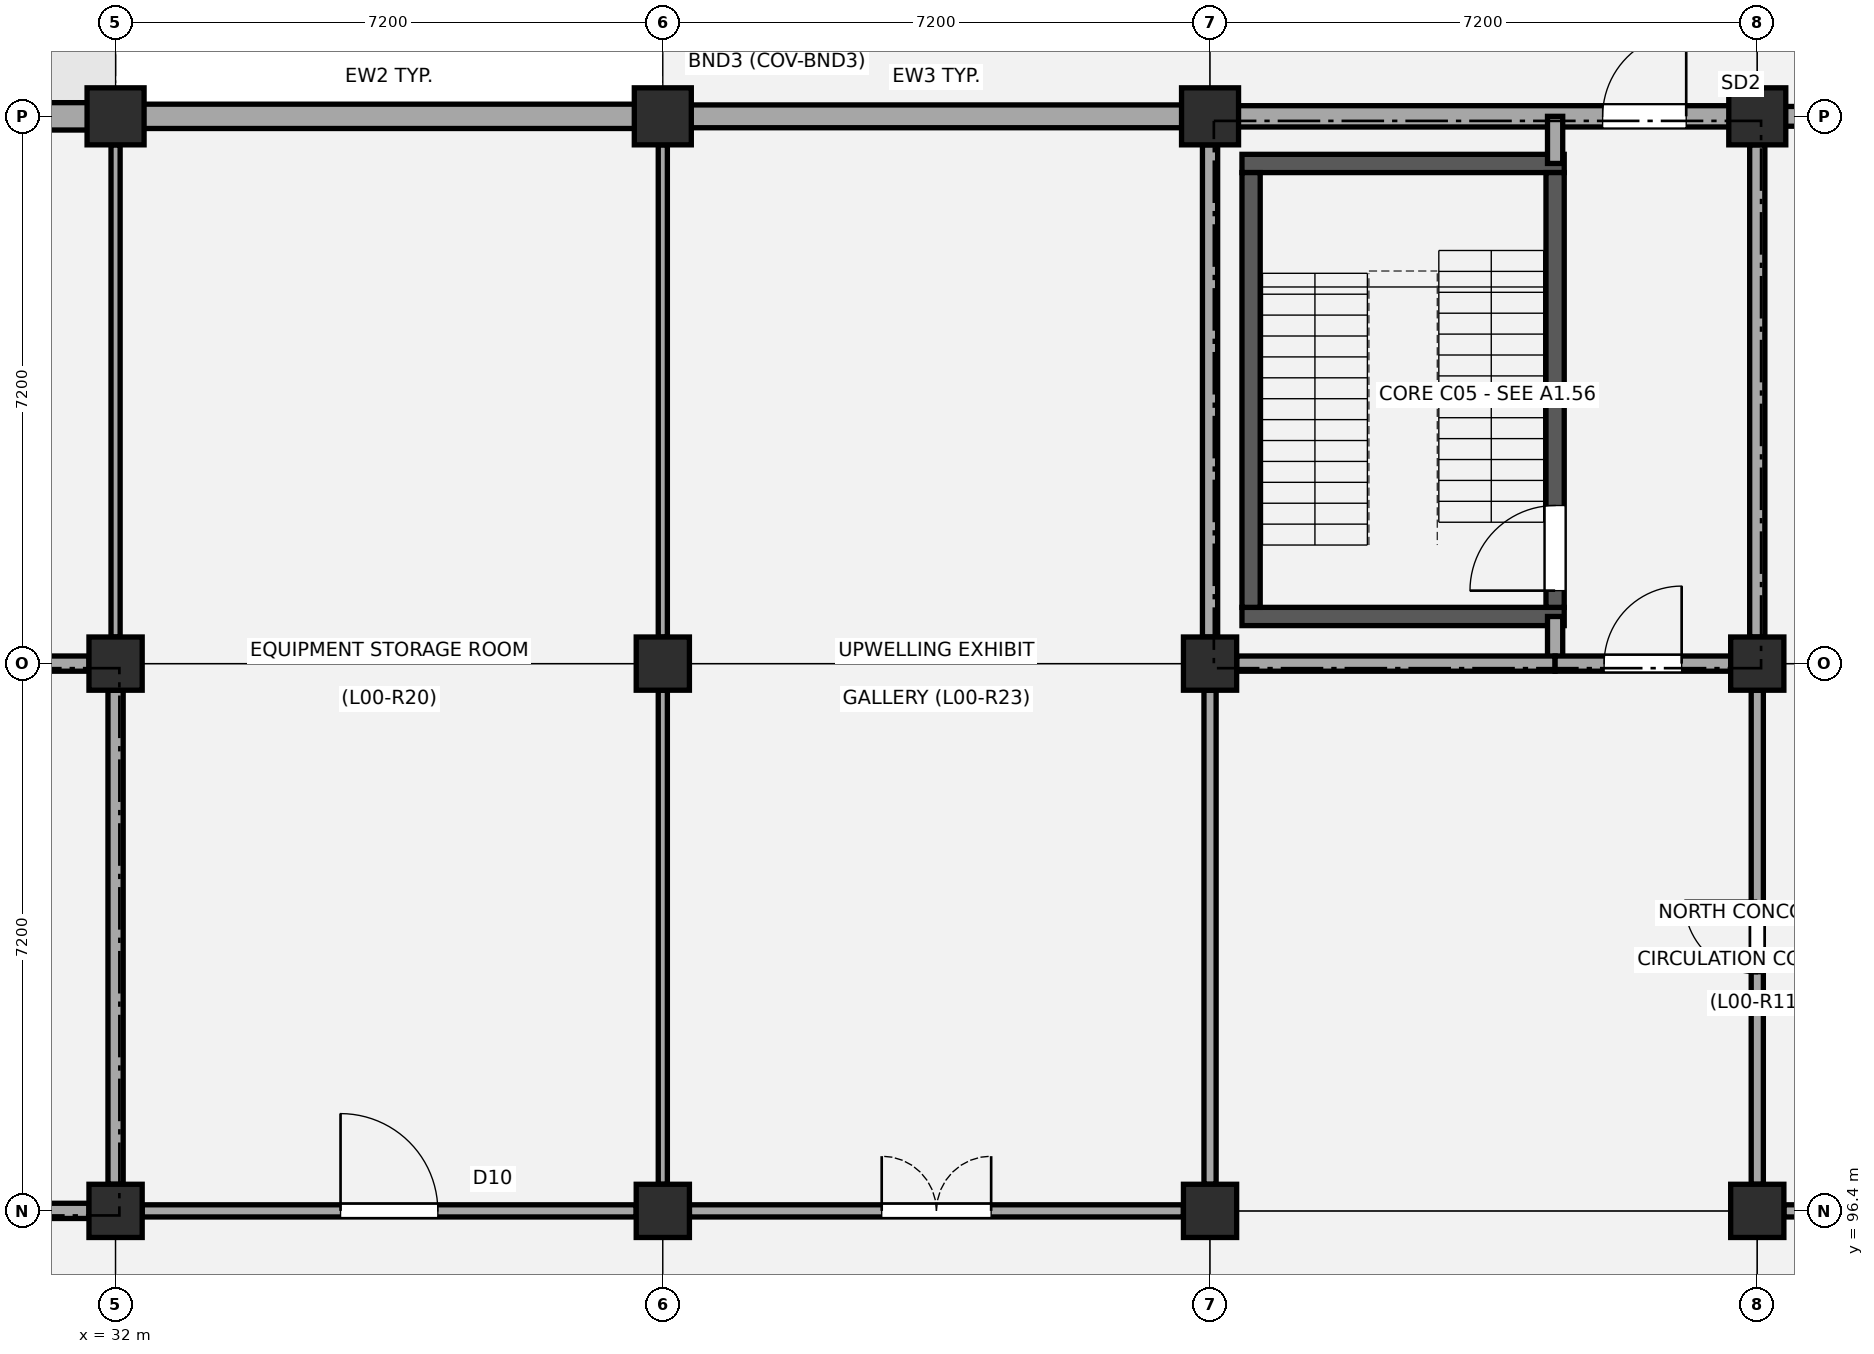
"""IFC4 building model, lengths in metres.
Left out: names, types, materials, properties, quantities, classifications, styles, units other than length and angle.
Written with IfcOpenShell. Run it as: python <this file> out.ifc"""

import sys

from ifc_helpers import new_model, si_unit, direction, frame, frame_2d, origin, origin_2d, place, context, subcontext, project, spatial, rectangle, circle, extrude, element, fill, save


model = new_model("IFC4")
c1 = context("Model", 3, precision=1e-05, world=origin(), true_north=direction((0.0, 1.0)))
c2 = subcontext(c1, "Body", "Model", "MODEL_VIEW")
j1 = project(units=[si_unit("LENGTHUNIT", "METRE"), si_unit("PLANEANGLEUNIT", "RADIAN")], contexts=[c1])
p1 = place(None, origin())
s1 = spatial("IfcSite", under=j1, at=p1, CompositionType="ELEMENT")
p2 = place(p1, origin())
s2 = spatial("IfcBuilding", under=s1, at=p2, CompositionType="ELEMENT")
p3 = place(p2, origin())
s3 = spatial("IfcBuildingStorey", under=s2, at=p3, CompositionType="ELEMENT", Elevation=0.0)
for number, where, z_axis, x_axis in (
    (1, (32.0, 96.4, -0.35), (0.0, 0.0, 1.0), (1.0, 0.0, 0.0)),
    (2, (32.0, 103.6, -0.35), (0.0, 0.0, 1.0), (1.0, 0.0, 0.0)),
):
    element("IfcColumn", number, at=place(p3, frame(where, z_axis=z_axis, x_axis=x_axis)), inside=s3, PredefinedType="COLUMN", context=c2, shape_type="SweptSolid", body=[
        extrude(rectangle(XDim=0.7, YDim=0.7, at=origin_2d()), origin(), (0.0, 0.0, 1.0), 5.03),
    ])
p4 = place(p3, frame((32.0, 110.8, -0.35), z_axis=(0.0, 0.0, 1.0), x_axis=(1.0, 0.0, 0.0)))
e3 = element("IfcColumn", 3, at=p4, inside=s3, PredefinedType="COLUMN", context=c2, shape_type="SweptSolid", body=[
    extrude(circle(Radius=0.375, at=origin_2d()), origin(), (0.0, 0.0, 1.0), 5.03),
])
for number, where, z_axis, x_axis in (
    (4, (39.2, 96.4, -0.35), (0.0, 0.0, 1.0), (1.0, 0.0, 0.0)),
    (5, (39.2, 103.6, -0.35), (0.0, 0.0, 1.0), (1.0, 0.0, 0.0)),
):
    element("IfcColumn", number, at=place(p3, frame(where, z_axis=z_axis, x_axis=x_axis)), inside=s3, PredefinedType="COLUMN", context=c2, shape_type="SweptSolid", body=[
        extrude(rectangle(XDim=0.7, YDim=0.7, at=origin_2d()), origin(), (0.0, 0.0, 1.0), 5.03),
    ])
p5 = place(p3, frame((39.2, 110.8, -0.35), z_axis=(0.0, 0.0, 1.0), x_axis=(1.0, 0.0, 0.0)))
e6 = element("IfcColumn", 6, at=p5, inside=s3, PredefinedType="COLUMN", context=c2, shape_type="SweptSolid", body=[
    extrude(circle(Radius=0.375, at=origin_2d()), origin(), (0.0, 0.0, 1.0), 5.03),
])
for number, where, z_axis, x_axis in (
    (7, (46.4, 96.4, -0.35), (0.0, 0.0, 1.0), (1.0, 0.0, 0.0)),
    (8, (46.4, 103.6, -0.35), (0.0, 0.0, 1.0), (1.0, 0.0, 0.0)),
):
    element("IfcColumn", number, at=place(p3, frame(where, z_axis=z_axis, x_axis=x_axis)), inside=s3, PredefinedType="COLUMN", context=c2, shape_type="SweptSolid", body=[
        extrude(rectangle(XDim=0.7, YDim=0.7, at=origin_2d()), origin(), (0.0, 0.0, 1.0), 5.03),
    ])
p6 = place(p3, frame((46.4, 110.8, -0.35), z_axis=(0.0, 0.0, 1.0), x_axis=(1.0, 0.0, 0.0)))
e9 = element("IfcColumn", 9, at=p6, inside=s3, PredefinedType="COLUMN", context=c2, shape_type="SweptSolid", body=[
    extrude(circle(Radius=0.375, at=origin_2d()), origin(), (0.0, 0.0, 1.0), 5.03),
])
for number, where, z_axis, x_axis in (
    (10, (53.6, 96.4, -0.35), (0.0, 0.0, 1.0), (1.0, 0.0, 0.0)),
    (11, (53.6, 103.6, -0.35), (0.0, 0.0, 1.0), (1.0, 0.0, 0.0)),
):
    element("IfcColumn", number, at=place(p3, frame(where, z_axis=z_axis, x_axis=x_axis)), inside=s3, PredefinedType="COLUMN", context=c2, shape_type="SweptSolid", body=[
        extrude(rectangle(XDim=0.7, YDim=0.7, at=origin_2d()), origin(), (0.0, 0.0, 1.0), 5.03),
    ])
p7 = place(p3, frame((53.6, 110.8, -0.35), z_axis=(0.0, 0.0, 1.0), x_axis=(1.0, 0.0, 0.0)))
e12 = element("IfcColumn", 12, at=p7, inside=s3, PredefinedType="COLUMN", context=c2, shape_type="SweptSolid", body=[
    extrude(circle(Radius=0.375, at=origin_2d()), origin(), (0.0, 0.0, 1.0), 5.03),
])
p8 = place(p3, frame((25.11, 110.8, 0.0), z_axis=(0.0, 0.0, 1.0), x_axis=(1.0, 0.0, 0.0)))
e13 = element("IfcWall", 13, at=p8, inside=s3, PredefinedType="STANDARD", context=c2, shape_type="SweptSolid", body=[
    extrude(rectangle(XDim=6.58, YDim=0.36, at=frame_2d((3.29, 0.0))), origin(), (0.0, 0.0, 1.0), 3.67),
])
p9 = place(p8, frame((1.59, 0.0, 0.0)))
e14 = element("IfcOpeningElement", 14, at=p9, cuts=e13, PredefinedType="OPENING", context=c2, shape_type="SweptSolid", body=[
    extrude(rectangle(XDim=3.4, YDim=3.3, at=frame_2d((1.7, 1.65))), frame((0.0, 0.19, 0.0), z_axis=(0.0, -1.0, 0.0), x_axis=(1.0, 0.0, 0.0)), (0.0, 0.0, 1.0), 0.38),
])
p10 = place(p3, frame((32.31, 110.8, 0.0), z_axis=(0.0, 0.0, 1.0), x_axis=(1.0, 0.0, 0.0)))
e15 = element("IfcWall", 15, at=p10, inside=s3, PredefinedType="STANDARD", context=c2, shape_type="SweptSolid", body=[
    extrude(rectangle(XDim=6.58, YDim=0.32, at=frame_2d((3.29, 0.0))), origin(), (0.0, 0.0, 1.0), 3.67),
])
p11 = place(p3, frame((39.51, 110.8, 0.0), z_axis=(0.0, 0.0, 1.0), x_axis=(1.0, 0.0, 0.0)))
e16 = element("IfcWall", 16, at=p11, inside=s3, PredefinedType="STANDARD", context=c2, shape_type="SweptSolid", body=[
    extrude(rectangle(XDim=6.58, YDim=0.3, at=frame_2d((3.29, 0.0))), origin(), (0.0, 0.0, 1.0), 3.67),
])
p12 = place(p3, frame((46.71, 110.8, 0.0), z_axis=(0.0, 0.0, 1.0), x_axis=(1.0, 0.0, 0.0)))
e17 = element("IfcWall", 17, at=p12, inside=s3, PredefinedType="STANDARD", context=c2, shape_type="SweptSolid", body=[
    extrude(rectangle(XDim=6.58, YDim=0.28, at=frame_2d((3.29, 0.0))), origin(), (0.0, 0.0, 1.0), 3.67),
])
p13 = place(p12, frame((4.855, 0.0, 0.0)))
e18 = element("IfcOpeningElement", 18, at=p13, cuts=e17, PredefinedType="OPENING", context=c2, shape_type="SweptSolid", body=[
    extrude(rectangle(XDim=1.1, YDim=2.15, at=frame_2d((0.55, 1.075))), frame((0.0, 0.15, 0.0), z_axis=(0.0, -1.0, 0.0), x_axis=(1.0, 0.0, 0.0)), (0.0, 0.0, 1.0), 0.3),
])
p14 = place(p3, frame((53.91, 110.8, 0.0), z_axis=(0.0, 0.0, 1.0), x_axis=(1.0, 0.0, 0.0)))
e19 = element("IfcWall", 19, at=p14, inside=s3, PredefinedType="STANDARD", context=c2, shape_type="SweptSolid", body=[
    extrude(rectangle(XDim=6.58, YDim=0.26, at=frame_2d((3.29, 0.0))), origin(), (0.0, 0.0, 1.0), 3.67),
])
p15 = place(p3, frame((32.0, 96.75, 0.0), z_axis=(0.0, 0.0, 1.0), x_axis=(0.0, 1.0, 0.0)))
e20 = element("IfcWall", 20, at=p15, inside=s3, PredefinedType="PARTITIONING", context=c2, shape_type="SweptSolid", body=[
    extrude(rectangle(XDim=6.5, YDim=0.2, at=frame_2d((3.25, 0.0))), origin(), (0.0, 0.0, 1.0), 3.62),
])
p16 = place(p3, frame((29.34, 96.4, 0.0), z_axis=(0.0, 0.0, 1.0), x_axis=(1.0, 0.0, 0.0)))
e21 = element("IfcWall", 21, at=p16, inside=s3, PredefinedType="PARTITIONING", context=c2, shape_type="SweptSolid", body=[
    extrude(rectangle(XDim=2.31, YDim=0.2, at=frame_2d((1.155, 0.0))), origin(), (0.0, 0.0, 1.0), 3.52),
])
p17 = place(p16, frame((0.645, 0.0, 0.0)))
e22 = element("IfcOpeningElement", 22, at=p17, cuts=e21, PredefinedType="OPENING", context=c2, shape_type="SweptSolid", body=[
    extrude(rectangle(XDim=1.02, YDim=2.15, at=frame_2d((0.51, 1.075))), frame((0.0, 0.11, 0.0), z_axis=(0.0, -1.0, 0.0), x_axis=(1.0, 0.0, 0.0)), (0.0, 0.0, 1.0), 0.22),
])
p18 = place(p3, frame((29.34, 103.6, 0.0), z_axis=(0.0, 0.0, 1.0), x_axis=(1.0, 0.0, 0.0)))
e23 = element("IfcWall", 23, at=p18, inside=s3, PredefinedType="PARTITIONING", context=c2, shape_type="SweptSolid", body=[
    extrude(rectangle(XDim=2.31, YDim=0.2, at=frame_2d((1.155, 0.0))), origin(), (0.0, 0.0, 1.0), 3.62),
])
for number, where, z_axis, x_axis in (
    (24, (46.82, 104.22, 0.0), (0.0, 0.0, 1.0), (1.0, 0.0, 0.0)),
    (25, (46.82, 110.18, 0.0), (0.0, 0.0, 1.0), (1.0, 0.0, 0.0)),
):
    element("IfcWall", number, at=place(p3, frame(where, z_axis=z_axis, x_axis=x_axis)), inside=s3, PredefinedType="SHEAR", context=c2, shape_type="SweptSolid", body=[
        extrude(rectangle(XDim=4.24, YDim=0.24, at=frame_2d((2.12, 0.0))), origin(), (0.0, 0.0, 1.0), 4.38),
    ])
p19 = place(p3, frame((46.94, 104.34, 0.0), z_axis=(0.0, 0.0, 1.0), x_axis=(0.0, 1.0, 0.0)))
e26 = element("IfcWall", 26, at=p19, inside=s3, PredefinedType="SHEAR", context=c2, shape_type="SweptSolid", body=[
    extrude(rectangle(XDim=5.72, YDim=0.24, at=frame_2d((2.86, 0.0))), origin(), (0.0, 0.0, 1.0), 4.38),
])
p20 = place(p3, frame((50.94, 104.34, 0.0), z_axis=(0.0, 0.0, 1.0), x_axis=(0.0, 1.0, 0.0)))
e27 = element("IfcWall", 27, at=p20, inside=s3, PredefinedType="SHEAR", context=c2, shape_type="SweptSolid", body=[
    extrude(rectangle(XDim=5.72, YDim=0.24, at=frame_2d((2.86, 0.0))), origin(), (0.0, 0.0, 1.0), 4.38),
])
p21 = place(p20, frame((0.22, 0.0, 0.0)))
e28 = element("IfcOpeningElement", 28, at=p21, cuts=e27, PredefinedType="OPENING", context=c2, shape_type="SweptSolid", body=[
    extrude(rectangle(XDim=1.12, YDim=2.15, at=frame_2d((0.56, 1.075))), frame((0.0, 0.13, 0.0), z_axis=(0.0, -1.0, 0.0), x_axis=(1.0, 0.0, 0.0)), (0.0, 0.0, 1.0), 0.26),
])
p22 = place(p3, frame((50.94, 103.6, 0.0), z_axis=(0.0, 0.0, 1.0), x_axis=(0.0, 1.0, 0.0)))
e29 = element("IfcWall", 29, at=p22, inside=s3, PredefinedType="PARTITIONING", context=c2, shape_type="SweptSolid", body=[
    extrude(rectangle(XDim=0.62, YDim=0.2, at=frame_2d((0.31, 0.0))), origin(), (0.0, 0.0, 1.0), 3.52),
])
p23 = place(p3, frame((50.94, 110.18, 0.0), z_axis=(0.0, 0.0, 1.0), x_axis=(0.0, 1.0, 0.0)))
e30 = element("IfcWall", 30, at=p23, inside=s3, PredefinedType="PARTITIONING", context=c2, shape_type="SweptSolid", body=[
    extrude(rectangle(XDim=0.62, YDim=0.2, at=frame_2d((0.31, 0.0))), origin(), (0.0, 0.0, 1.0), 3.67),
])
for number, where, z_axis, x_axis in (
    (31, (46.4, 103.95, 0.0), (0.0, 0.0, 1.0), (0.0, 1.0, 0.0)),
    (32, (53.6, 103.95, 0.0), (0.0, 0.0, 1.0), (0.0, 1.0, 0.0)),
):
    element("IfcWall", number, at=place(p3, frame(where, z_axis=z_axis, x_axis=x_axis)), inside=s3, PredefinedType="PARTITIONING", context=c2, shape_type="SweptSolid", body=[
        extrude(rectangle(XDim=6.475, YDim=0.2, at=frame_2d((3.238, 0.0))), origin(), (0.0, 0.0, 1.0), 3.62),
    ])
p24 = place(p3, frame((46.75, 103.6, 0.0), z_axis=(0.0, 0.0, 1.0), x_axis=(1.0, 0.0, 0.0)))
e33 = element("IfcWall", 33, at=p24, inside=s3, PredefinedType="PARTITIONING", context=c2, shape_type="SweptSolid", body=[
    extrude(rectangle(XDim=4.19, YDim=0.2, at=frame_2d((2.095, 0.0))), origin(), (0.0, 0.0, 1.0), 3.52),
])
p25 = place(p3, frame((50.94, 103.6, 0.0), z_axis=(0.0, 0.0, 1.0), x_axis=(1.0, 0.0, 0.0)))
e34 = element("IfcWall", 34, at=p25, inside=s3, PredefinedType="PARTITIONING", context=c2, shape_type="SweptSolid", body=[
    extrude(rectangle(XDim=2.31, YDim=0.2, at=frame_2d((1.155, 0.0))), origin(), (0.0, 0.0, 1.0), 3.52),
])
p26 = place(p25, frame((0.645, 0.0, 0.0)))
e35 = element("IfcOpeningElement", 35, at=p26, cuts=e34, PredefinedType="OPENING", context=c2, shape_type="SweptSolid", body=[
    extrude(rectangle(XDim=1.02, YDim=2.15, at=frame_2d((0.51, 1.075))), frame((0.0, 0.11, 0.0), z_axis=(0.0, -1.0, 0.0), x_axis=(1.0, 0.0, 0.0)), (0.0, 0.0, 1.0), 0.22),
])
p27 = place(p3, frame((32.0, 103.95, 0.0), z_axis=(0.0, 0.0, 1.0), x_axis=(0.0, 1.0, 0.0)))
e36 = element("IfcWall", 36, at=p27, inside=s3, PredefinedType="PARTITIONING", context=c2, shape_type="SweptSolid", body=[
    extrude(rectangle(XDim=6.475, YDim=0.12, at=frame_2d((3.238, 0.0))), origin(), (0.0, 0.0, 1.0), 3.62),
])
p28 = place(p3, frame((32.35, 96.4, 0.0), z_axis=(0.0, 0.0, 1.0), x_axis=(1.0, 0.0, 0.0)))
e37 = element("IfcWall", 37, at=p28, inside=s3, PredefinedType="PARTITIONING", context=c2, shape_type="SweptSolid", body=[
    extrude(rectangle(XDim=6.5, YDim=0.16, at=frame_2d((3.25, 0.0))), origin(), (0.0, 0.0, 1.0), 3.62),
])
p29 = place(p28, frame((2.61, 0.0, 0.0)))
e38 = element("IfcOpeningElement", 38, at=p29, cuts=e37, PredefinedType="OPENING", context=c2, shape_type="SweptSolid", body=[
    extrude(rectangle(XDim=1.28, YDim=2.2, at=frame_2d((0.64, 1.1))), frame((0.0, 0.09, 0.0), z_axis=(0.0, -1.0, 0.0), x_axis=(1.0, 0.0, 0.0)), (0.0, 0.0, 1.0), 0.18),
])
p30 = place(p3, frame((39.2, 96.75, 0.0), z_axis=(0.0, 0.0, 1.0), x_axis=(0.0, 1.0, 0.0)))
e39 = element("IfcWall", 39, at=p30, inside=s3, PredefinedType="PARTITIONING", context=c2, shape_type="SweptSolid", body=[
    extrude(rectangle(XDim=6.5, YDim=0.12, at=frame_2d((3.25, 0.0))), origin(), (0.0, 0.0, 1.0), 3.62),
])
p31 = place(p3, frame((39.2, 103.95, 0.0), z_axis=(0.0, 0.0, 1.0), x_axis=(0.0, 1.0, 0.0)))
e40 = element("IfcWall", 40, at=p31, inside=s3, PredefinedType="PARTITIONING", context=c2, shape_type="SweptSolid", body=[
    extrude(rectangle(XDim=6.475, YDim=0.12, at=frame_2d((3.238, 0.0))), origin(), (0.0, 0.0, 1.0), 3.62),
])
p32 = place(p3, frame((39.55, 96.4, 0.0), z_axis=(0.0, 0.0, 1.0), x_axis=(1.0, 0.0, 0.0)))
e41 = element("IfcWall", 41, at=p32, inside=s3, PredefinedType="PARTITIONING", context=c2, shape_type="SweptSolid", body=[
    extrude(rectangle(XDim=6.5, YDim=0.16, at=frame_2d((3.25, 0.0))), origin(), (0.0, 0.0, 1.0), 3.52),
])
p33 = place(p32, frame((2.53, 0.0, 0.0)))
e42 = element("IfcOpeningElement", 42, at=p33, cuts=e41, PredefinedType="OPENING", context=c2, shape_type="SweptSolid", body=[
    extrude(rectangle(XDim=1.44, YDim=2.2, at=frame_2d((0.72, 1.1))), frame((0.0, 0.09, 0.0), z_axis=(0.0, -1.0, 0.0), x_axis=(1.0, 0.0, 0.0)), (0.0, 0.0, 1.0), 0.18),
])
p34 = place(p3, frame((46.4, 96.75, 0.0), z_axis=(0.0, 0.0, 1.0), x_axis=(0.0, 1.0, 0.0)))
e43 = element("IfcWall", 43, at=p34, inside=s3, PredefinedType="PARTITIONING", context=c2, shape_type="SweptSolid", body=[
    extrude(rectangle(XDim=6.5, YDim=0.16, at=frame_2d((3.25, 0.0))), origin(), (0.0, 0.0, 1.0), 3.62),
])
p35 = place(p3, frame((53.6, 96.75, 0.0), z_axis=(0.0, 0.0, 1.0), x_axis=(0.0, 1.0, 0.0)))
e44 = element("IfcWall", 44, at=p35, inside=s3, PredefinedType="PARTITIONING", context=c2, shape_type="SweptSolid", body=[
    extrude(rectangle(XDim=6.5, YDim=0.16, at=frame_2d((3.25, 0.0))), origin(), (0.0, 0.0, 1.0), 3.62),
])
p36 = place(p35, frame((2.77, 0.0, 0.0)))
e45 = element("IfcOpeningElement", 45, at=p36, cuts=e44, PredefinedType="OPENING", context=c2, shape_type="SweptSolid", body=[
    extrude(rectangle(XDim=0.96, YDim=2.1, at=frame_2d((0.48, 1.05))), frame((0.0, 0.09, 0.0), z_axis=(0.0, -1.0, 0.0), x_axis=(1.0, 0.0, 0.0)), (0.0, 0.0, 1.0), 0.18),
])
p37 = place(p3, frame((53.95, 96.4, 0.0), z_axis=(0.0, 0.0, 1.0), x_axis=(1.0, 0.0, 0.0)))
e46 = element("IfcWall", 46, at=p37, inside=s3, PredefinedType="PARTITIONING", context=c2, shape_type="SweptSolid", body=[
    extrude(rectangle(XDim=6.5, YDim=0.16, at=frame_2d((3.25, 0.0))), origin(), (0.0, 0.0, 1.0), 3.52),
])
p38 = place(p13, origin())
e47 = element("IfcDoor", 47, at=p38, inside=s3, OperationType="SINGLE_SWING_RIGHT", PredefinedType="DOOR", context=c2, shape_type="SweptSolid", body=[
    extrude(rectangle(XDim=1.1, YDim=2.15, at=frame_2d((0.55, 1.075))), frame((0.0, 0.025, 0.0), z_axis=(0.0, -1.0, 0.0), x_axis=(1.0, 0.0, 0.0)), (0.0, 0.0, 1.0), 0.05),
])
fill(e18, e47)
p39 = place(p21, origin())
e48 = element("IfcDoor", 48, at=p39, inside=s3, OperationType="SINGLE_SWING_LEFT", PredefinedType="DOOR", context=c2, shape_type="SweptSolid", body=[
    extrude(rectangle(XDim=1.12, YDim=2.15, at=frame_2d((0.56, 1.075))), frame((0.0, 0.025, 0.0), z_axis=(0.0, -1.0, 0.0), x_axis=(1.0, 0.0, 0.0)), (0.0, 0.0, 1.0), 0.05),
])
fill(e28, e48)
p40 = place(p26, origin())
e49 = element("IfcDoor", 49, at=p40, inside=s3, OperationType="SINGLE_SWING_RIGHT", PredefinedType="DOOR", context=c2, shape_type="SweptSolid", body=[
    extrude(rectangle(XDim=1.02, YDim=2.15, at=frame_2d((0.51, 1.075))), frame((0.0, 0.025, 0.0), z_axis=(0.0, -1.0, 0.0), x_axis=(1.0, 0.0, 0.0)), (0.0, 0.0, 1.0), 0.05),
])
fill(e35, e49)
p41 = place(p29, origin())
e50 = element("IfcDoor", 50, at=p41, inside=s3, OperationType="SINGLE_SWING_LEFT", PredefinedType="DOOR", context=c2, shape_type="SweptSolid", body=[
    extrude(rectangle(XDim=1.28, YDim=2.2, at=frame_2d((0.64, 1.1))), frame((0.0, 0.025, 0.0), z_axis=(0.0, -1.0, 0.0), x_axis=(1.0, 0.0, 0.0)), (0.0, 0.0, 1.0), 0.05),
])
fill(e38, e50)
p42 = place(p33, origin())
e51 = element("IfcDoor", 51, at=p42, inside=s3, OperationType="DOUBLE_DOOR_SINGLE_SWING", PredefinedType="DOOR", context=c2, shape_type="SweptSolid", body=[
    extrude(rectangle(XDim=1.44, YDim=2.2, at=frame_2d((0.72, 1.1))), frame((0.0, 0.025, 0.0), z_axis=(0.0, -1.0, 0.0), x_axis=(1.0, 0.0, 0.0)), (0.0, 0.0, 1.0), 0.05),
])
fill(e42, e51)
p43 = place(p36, origin())
e52 = element("IfcDoor", 52, at=p43, inside=s3, OperationType="SINGLE_SWING_RIGHT", PredefinedType="DOOR", context=c2, shape_type="SweptSolid", body=[
    extrude(rectangle(XDim=0.96, YDim=2.1, at=frame_2d((0.48, 1.05))), frame((0.0, 0.025, 0.0), z_axis=(0.0, -1.0, 0.0), x_axis=(1.0, 0.0, 0.0)), (0.0, 0.0, 1.0), 0.05),
])
fill(e45, e52)
save(model, sys.argv[1])
